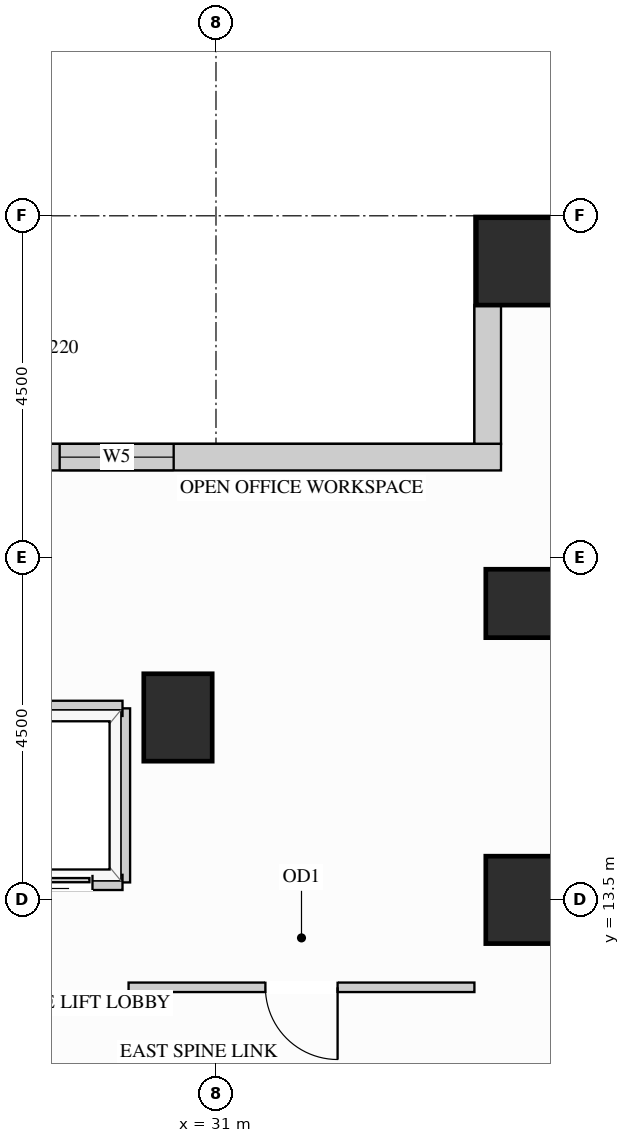
"""IFC4 building model, lengths in metres.
Left out: names, types, materials, properties, quantities, classifications, styles, units other than length and angle.
Written with IfcOpenShell. Run it as: python <this file> out.ifc"""

import sys

from ifc_helpers import new_model, si_unit, direction, frame, frame_2d, origin, origin_2d, place, context, subcontext, project, spatial, rectangle, extrude, source, transform, mapped, element, fill, save


model = new_model("IFC4")
c1 = context("Model", 3, precision=1e-05, world=origin(), true_north=direction((0.0, 1.0)))
c2 = subcontext(c1, "Body", "Model", "MODEL_VIEW")
j1 = project(units=[si_unit("LENGTHUNIT", "METRE"), si_unit("PLANEANGLEUNIT", "RADIAN")], contexts=[c1])
p1 = place(None, origin())
s1 = spatial("IfcSite", under=j1, at=p1, CompositionType="ELEMENT")
p2 = place(p1, origin())
s2 = spatial("IfcBuilding", under=s1, at=p2, CompositionType="ELEMENT")
p3 = place(p2, frame((0.0, 0.0, 131.4)))
s3 = spatial("IfcBuildingStorey", under=s2, at=p3, CompositionType="ELEMENT", Elevation=131.4)
m1 = source(origin(), c2, "Body", "SweptSolid", [
    extrude(rectangle(XDim=0.9, YDim=0.9, at=origin_2d()), origin(), (0.0, 0.0, 1.0), 3.38),
])
p4 = place(p3, frame((35.0, 17.4, 0.0), z_axis=(0.0, 0.0, 1.0), x_axis=(1.0, 0.0, 0.0)))
e1 = element("IfcColumn", 1, at=p4, inside=s3, PredefinedType="COLUMN", context=c2, shape_type="MappedRepresentation", body=[
    mapped(m1, transform((0.0, 0.0, 0.0), x_axis=(1.0, 0.0, 0.0), y_axis=(0.0, 1.0, 0.0), z_axis=(0.0, 0.0, 1.0))),
])
m2 = source(origin(), c2, "Body", "SweptSolid", [
    extrude(rectangle(XDim=0.9, YDim=1.15, at=origin_2d()), origin(), (0.0, 0.0, 1.0), 3.38),
])
for number, where, z_axis, x_axis in (
    (2, (35.0, 13.5, 0.0), (0.0, 0.0, 1.0), (1.0, 0.0, 0.0)),
    (3, (30.5, 15.9, 0.0), (0.0, 0.0, 1.0), (1.0, 0.0, 0.0)),
):
    element("IfcColumn", number, at=place(p3, frame(where, z_axis=z_axis, x_axis=x_axis)), inside=s3, PredefinedType="COLUMN", context=c2, shape_type="MappedRepresentation", body=[
        mapped(m2, transform((0.0, 0.0, 0.0), x_axis=(1.0, 0.0, 0.0), y_axis=(0.0, 1.0, 0.0), z_axis=(0.0, 0.0, 1.0))),
    ])
m3 = source(origin(), c2, "Body", "SweptSolid", [
    extrude(rectangle(XDim=1.15, YDim=1.15, at=origin_2d()), origin(), (0.0, 0.0, 1.0), 3.38),
])
p5 = place(p3, frame((35.0, 21.9, 0.0), z_axis=(0.0, 0.0, 1.0), x_axis=(1.0, 0.0, 0.0)))
e4 = element("IfcColumn", 4, at=p5, inside=s3, PredefinedType="COLUMN", context=c2, shape_type="MappedRepresentation", body=[
    mapped(m3, transform((0.0, 0.0, 0.0), x_axis=(1.0, 0.0, 0.0), y_axis=(0.0, 1.0, 0.0), z_axis=(0.0, 0.0, 1.0))),
])
m4 = source(origin(), c2, "Body", "SweptSolid", [
    extrude(rectangle(XDim=1.829, YDim=0.35, at=frame_2d((0.915, 0.0))), origin(), (0.0, 0.0, 1.0), 3.365),
])
p6 = place(p3, frame((34.575, 21.327, 0.0), z_axis=(0.0, 0.0, 1.0), x_axis=(0.0, -1.0, 0.0)))
e5 = element("IfcWall", 5, at=p6, inside=s3, PredefinedType="SOLIDWALL", context=c2, shape_type="MappedRepresentation", body=[
    mapped(m4, transform((0.0, 0.0, 0.0), x_axis=(1.0, 0.0, 0.0), y_axis=(0.0, 1.0, 0.0), z_axis=(0.0, 0.0, 1.0))),
])
p7 = place(p3, frame((34.75, 19.325, 0.0), z_axis=(0.0, 0.0, 1.0), x_axis=(-1.0, 0.0, 0.0)))
e6 = element("IfcWall", 6, at=p7, inside=s3, PredefinedType="SOLIDWALL", context=c2, shape_type="SweptSolid", body=[
    extrude(rectangle(XDim=15.6, YDim=0.35, at=frame_2d((7.8, 0.0))), origin(), (0.0, 0.0, 1.0), 3.365),
])
p8 = place(p7, frame((4.307, 0.0, 0.78)))
e7 = element("IfcOpeningElement", 7, at=p8, cuts=e6, PredefinedType="OPENING", context=c2, shape_type="SweptSolid", body=[
    extrude(rectangle(XDim=1.5, YDim=2.0, at=frame_2d((0.75, 1.0))), frame((0.0, 0.185, 0.0), z_axis=(0.0, -1.0, 0.0), x_axis=(1.0, 0.0, 0.0)), (0.0, 0.0, 1.0), 0.37),
])
p9 = place(p7, frame((9.793, 0.0, 0.78)))
e8 = element("IfcOpeningElement", 8, at=p9, cuts=e6, PredefinedType="OPENING", context=c2, shape_type="SweptSolid", body=[
    extrude(rectangle(XDim=1.5, YDim=2.0, at=frame_2d((0.75, 1.0))), frame((0.0, 0.185, 0.0), z_axis=(0.0, -1.0, 0.0), x_axis=(1.0, 0.0, 0.0)), (0.0, 0.0, 1.0), 0.37),
])
p10 = place(p3, frame((29.85, 12.35, 0.0), z_axis=(0.0, 0.0, 1.0), x_axis=(1.0, 0.0, 0.0)))
e9 = element("IfcWall", 9, at=p10, inside=s3, PredefinedType="PARTITIONING", context=c2, shape_type="SweptSolid", body=[
    extrude(rectangle(XDim=4.55, YDim=0.125, at=frame_2d((2.275, 0.0))), origin(), (0.0, 0.0, 1.0), 3.365),
])
p11 = place(p10, frame((1.8, 0.0, 0.0)))
e10 = element("IfcOpeningElement", 10, at=p11, cuts=e9, PredefinedType="OPENING", context=c2, shape_type="SweptSolid", body=[
    extrude(rectangle(XDim=0.95, YDim=2.15, at=frame_2d((0.475, 1.075))), frame((0.0, 0.073, 0.0), z_axis=(0.0, -1.0, 0.0), x_axis=(1.0, 0.0, 0.0)), (0.0, 0.0, 1.0), 0.145),
])
m5 = source(origin(), c2, "Body", "SweptSolid", [
    extrude(rectangle(XDim=2.29, YDim=0.2, at=frame_2d((1.145, 0.0))), origin(), (0.0, 0.0, 1.0), 3.365),
])
p12 = place(p3, frame((29.77, 13.73, 0.0), z_axis=(0.0, 0.0, 1.0), x_axis=(0.0, 1.0, 0.0)))
e11 = element("IfcWall", 11, at=p12, inside=s3, PredefinedType="PARTITIONING", context=c2, shape_type="MappedRepresentation", body=[
    mapped(m5, transform((0.0, 0.0, 0.0), x_axis=(1.0, 0.0, 0.0), y_axis=(0.0, 1.0, 0.0), z_axis=(0.0, 0.0, 1.0))),
])
m6 = source(origin(), c2, "Body", "SweptSolid", [
    extrude(rectangle(XDim=1.89, YDim=0.2, at=frame_2d((0.945, 0.0))), origin(), (0.0, 0.0, 1.0), 2.677),
])
p13 = place(p3, frame((27.88, 16.02, 0.0), z_axis=(0.0, 0.0, 1.0), x_axis=(1.0, 0.0, 0.0)))
e12 = element("IfcWall", 12, at=p13, inside=s3, PredefinedType="PARTITIONING", context=c2, shape_type="MappedRepresentation", body=[
    mapped(m6, transform((0.0, 0.0, 0.0), x_axis=(1.0, 0.0, 0.0), y_axis=(0.0, 1.0, 0.0), z_axis=(0.0, 0.0, 1.0))),
])
p14 = place(p3, frame((27.88, 13.73, 0.0), z_axis=(0.0, 0.0, 1.0), x_axis=(1.0, 0.0, 0.0)))
e13 = element("IfcWall", 13, at=p14, inside=s3, PredefinedType="PARTITIONING", context=c2, shape_type="SweptSolid", body=[
    extrude(rectangle(XDim=1.89, YDim=0.2, at=frame_2d((0.945, 0.0))), origin(), (0.0, 0.0, 1.0), 2.446),
])
p15 = place(p14, frame((0.395, 0.0, 0.0)))
e14 = element("IfcOpeningElement", 14, at=p15, cuts=e13, PredefinedType="OPENING", context=c2, shape_type="SweptSolid", body=[
    extrude(rectangle(XDim=1.1, YDim=2.2, at=frame_2d((0.55, 1.1))), frame((0.0, 0.11, 0.0), z_axis=(0.0, -1.0, 0.0), x_axis=(1.0, 0.0, 0.0)), (0.0, 0.0, 1.0), 0.22),
])
m7 = source(origin(), c2, "Body", "SweptSolid", [
    extrude(rectangle(XDim=1.1, YDim=2.2, at=frame_2d((0.55, 1.1))), frame((0.0, 0.025, 0.0), z_axis=(0.0, -1.0, 0.0), x_axis=(1.0, 0.0, 0.0)), (0.0, 0.0, 1.0), 0.05),
])
p16 = place(p15, origin())
e15 = element("IfcDoor", 15, at=p16, inside=s3, OperationType="SLIDING_TO_LEFT", PredefinedType="DOOR", context=c2, shape_type="MappedRepresentation", body=[
    mapped(m7, transform((0.0, 0.0, 0.0), x_axis=(1.0, 0.0, 0.0), y_axis=(0.0, 1.0, 0.0), z_axis=(0.0, 0.0, 1.0))),
])
fill(e14, e15)
m8 = source(origin(), c2, "Body", "SweptSolid", [
    extrude(rectangle(XDim=0.95, YDim=2.15, at=frame_2d((0.475, 1.075))), frame((0.0, 0.025, 0.0), z_axis=(0.0, -1.0, 0.0), x_axis=(1.0, 0.0, 0.0)), (0.0, 0.0, 1.0), 0.05),
])
p17 = place(p11, origin())
e16 = element("IfcDoor", 16, at=p17, inside=s3, OperationType="SINGLE_SWING_RIGHT", PredefinedType="DOOR", context=c2, shape_type="MappedRepresentation", body=[
    mapped(m8, transform((0.0, 0.0, 0.0), x_axis=(1.0, 0.0, 0.0), y_axis=(0.0, 1.0, 0.0), z_axis=(0.0, 0.0, 1.0))),
])
fill(e10, e16)
m9 = source(origin(), c2, "Body", "SweptSolid", [
    extrude(rectangle(XDim=1.5, YDim=2.0, at=frame_2d((0.75, 1.0))), frame((0.0, 0.03, 0.0), z_axis=(0.0, -1.0, 0.0), x_axis=(1.0, 0.0, 0.0)), (0.0, 0.0, 1.0), 0.06),
])
p18 = place(p8, origin())
e17 = element("IfcWindow", 17, at=p18, inside=s3, PartitioningType="SINGLE_PANEL", PredefinedType="WINDOW", context=c2, shape_type="MappedRepresentation", body=[
    mapped(m9, transform((0.0, 0.0, 0.0), x_axis=(1.0, 0.0, 0.0), y_axis=(0.0, 1.0, 0.0), z_axis=(0.0, 0.0, 1.0))),
])
fill(e7, e17)
save(model, sys.argv[1])
